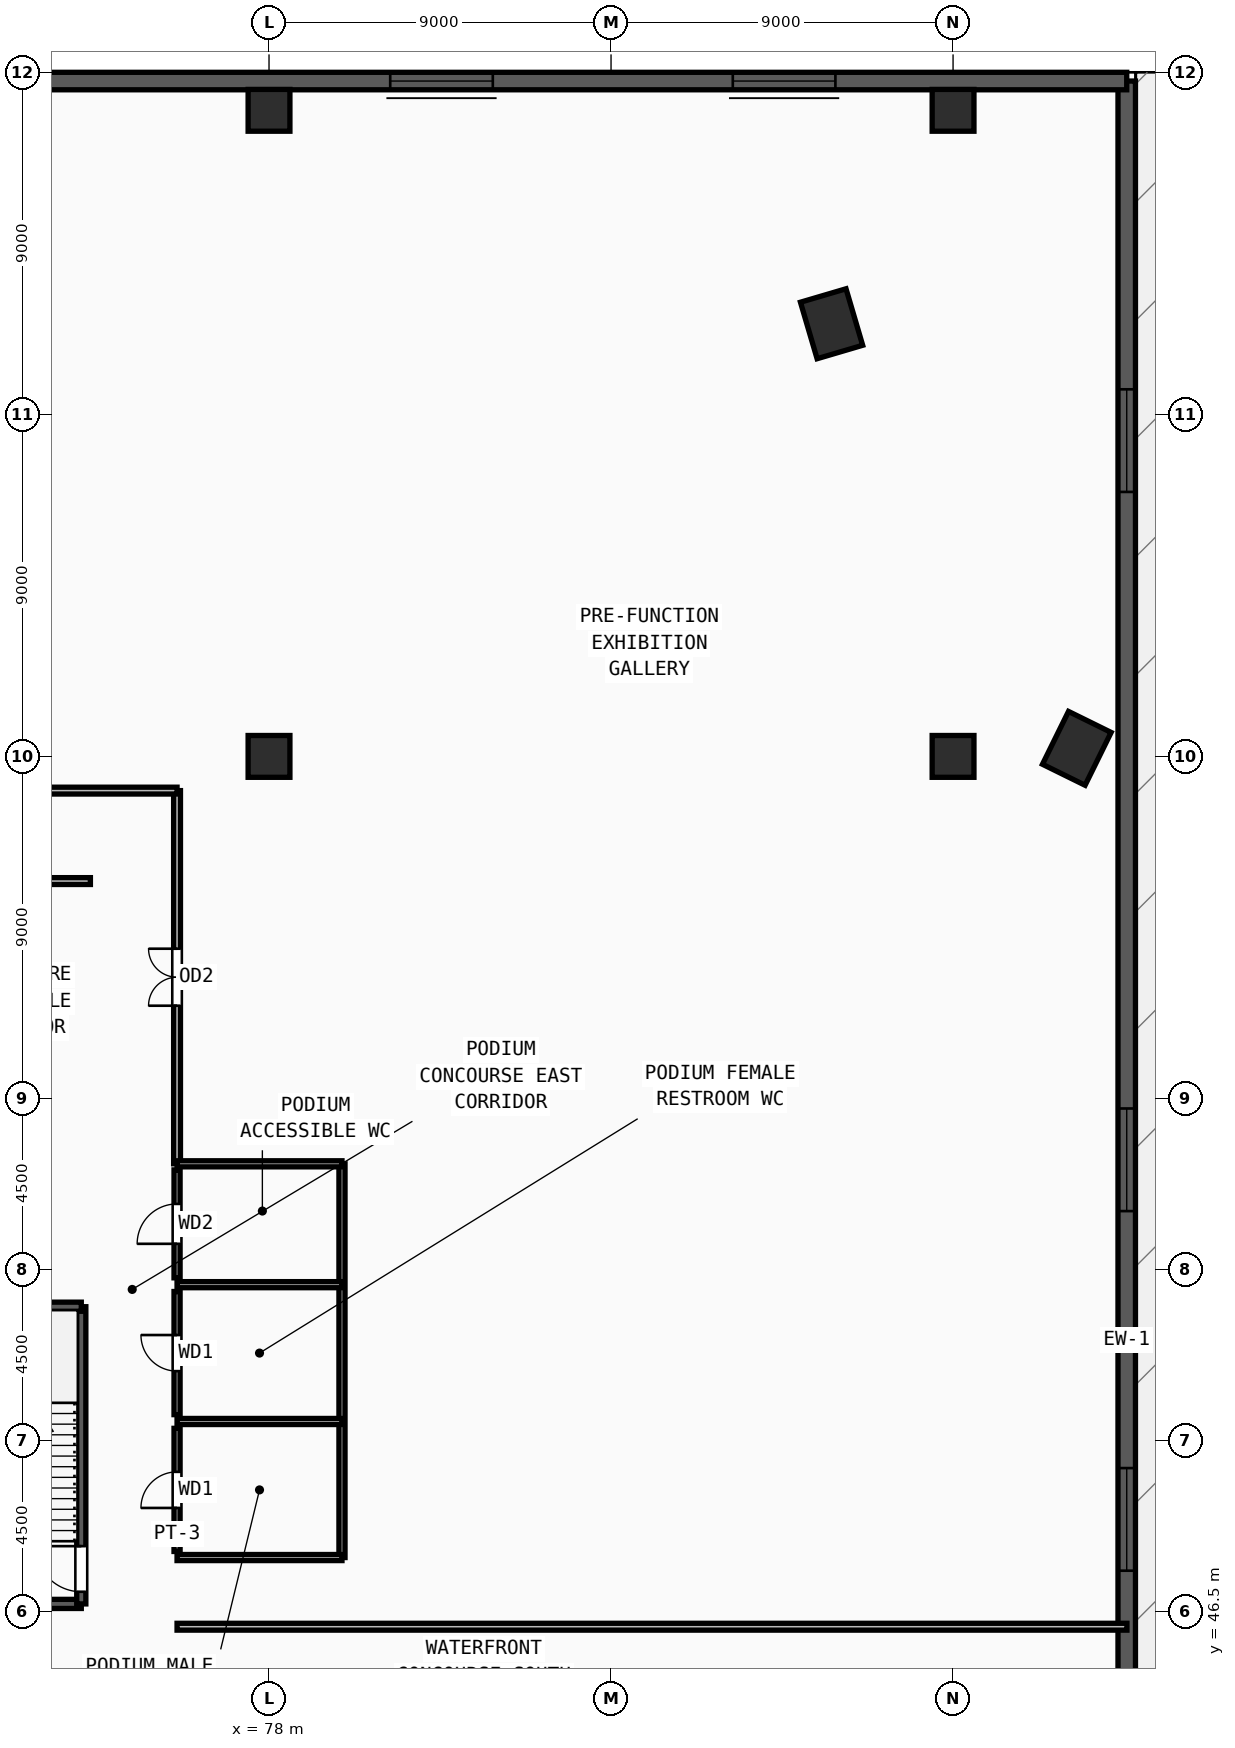
"""IFC4 building model, lengths in metres.
Left out: names, types, materials, properties, quantities, classifications, styles, units other than length and angle.
Written with IfcOpenShell. Run it as: python <this file> out.ifc"""

import sys

from ifc_helpers import new_model, si_unit, direction, frame, frame_2d, origin, origin_2d, place, context, subcontext, project, spatial, rectangle, extrude, source, transform, mapped, element, fill, save


model = new_model("IFC4")
c1 = context("Model", 3, precision=1e-05, world=origin(), true_north=direction((0.0, 1.0)))
c2 = subcontext(c1, "Body", "Model", "MODEL_VIEW")
j1 = project(units=[si_unit("LENGTHUNIT", "METRE"), si_unit("PLANEANGLEUNIT", "RADIAN")], contexts=[c1])
p1 = place(None, origin())
s1 = spatial("IfcSite", under=j1, at=p1, CompositionType="ELEMENT")
p2 = place(p1, origin())
s2 = spatial("IfcBuilding", under=s1, at=p2, CompositionType="ELEMENT")
p3 = place(p2, frame((0.0, 0.0, 9.9)))
s3 = spatial("IfcBuildingStorey", under=s2, at=p3, CompositionType="ELEMENT", Elevation=9.9)
m1 = source(origin(), c2, "Body", "SweptSolid", [
    extrude(rectangle(XDim=1.55, YDim=1.25, at=origin_2d()), origin(), (0.0, 0.0, 1.0), 4.5),
])
for number, where, z_axis, x_axis in (
    (1, (92.803, 80.384, 0.0), (0.0, 0.0, 1.0), (-0.283, 0.959, 0.0)),
    (2, (99.256, 69.212, 0.0), (0.0, 0.0, 1.0), (0.442, 0.897, 0.0)),
):
    element("IfcColumn", number, at=place(p3, frame(where, z_axis=z_axis, x_axis=x_axis)), inside=s3, PredefinedType="COLUMN", context=c2, shape_type="MappedRepresentation", body=[
        mapped(m1, transform((0.0, 0.0, 0.0), x_axis=(1.0, 0.0, 0.0), y_axis=(0.0, 1.0, 0.0), z_axis=(0.0, 0.0, 1.0), scale=1.0)),
    ])
m2 = source(origin(), c2, "Body", "SweptSolid", [
    extrude(rectangle(XDim=1.1, YDim=1.1, at=origin_2d()), origin(), (0.0, 0.0, 1.0), 4.5),
])
for number, where, z_axis, x_axis in (
    (3, (78.0, 69.0, 0.0), (0.0, 0.0, 1.0), (1.0, 0.0, 0.0)),
    (4, (96.0, 69.0, 0.0), (0.0, 0.0, 1.0), (1.0, 0.0, 0.0)),
    (5, (78.0, 86.0, 0.0), (0.0, 0.0, 1.0), (1.0, 0.0, 0.0)),
    (6, (96.0, 86.0, 0.0), (0.0, 0.0, 1.0), (1.0, 0.0, 0.0)),
):
    element("IfcColumn", number, at=place(p3, frame(where, z_axis=z_axis, x_axis=x_axis)), inside=s3, PredefinedType="COLUMN", context=c2, shape_type="MappedRepresentation", body=[
        mapped(m2, transform((0.0, 0.0, 0.0), x_axis=(1.0, 0.0, 0.0), y_axis=(0.0, 1.0, 0.0), z_axis=(0.0, 0.0, 1.0), scale=1.0)),
    ])
p4 = place(p3, frame((100.57, 20.54, 0.0), z_axis=(0.0, 0.0, 1.0), x_axis=(0.0, 1.0, 0.0)))
e7 = element("IfcWall", 7, at=p4, inside=s3, PredefinedType="SOLIDWALL", context=c2, shape_type="SweptSolid", body=[
    extrude(rectangle(XDim=66.23, YDim=0.46, at=frame_2d((33.115, 0.0))), origin(), (0.0, 0.0, 1.0), 4.25),
])
m3 = source(origin(), c2, "Body", "SweptSolid", [
    extrude(rectangle(XDim=2.7, YDim=2.35, at=frame_2d((1.35, 1.175))), frame((0.0, 0.24, 0.0), z_axis=(0.0, -1.0, 0.0), x_axis=(1.0, 0.0, 0.0)), (0.0, 0.0, 1.0), 0.48),
])
p5 = place(p4, frame((8.111, 0.0, 0.55)))
e8 = element("IfcOpeningElement", 8, at=p5, cuts=e7, PredefinedType="OPENING", context=c2, shape_type="MappedRepresentation", body=[
    mapped(m3, transform((0.0, 0.0, 0.0), x_axis=(1.0, 0.0, 0.0), y_axis=(0.0, 1.0, 0.0), z_axis=(0.0, 0.0, 1.0), scale=1.0)),
])
p6 = place(p4, frame((17.573, 0.0, 0.55)))
e9 = element("IfcOpeningElement", 9, at=p6, cuts=e7, PredefinedType="OPENING", context=c2, shape_type="MappedRepresentation", body=[
    mapped(m3, transform((0.0, 0.0, 0.0), x_axis=(1.0, 0.0, 0.0), y_axis=(0.0, 1.0, 0.0), z_axis=(0.0, 0.0, 1.0), scale=1.0)),
])
p7 = place(p4, frame((27.034, 0.0, 0.55)))
e10 = element("IfcOpeningElement", 10, at=p7, cuts=e7, PredefinedType="OPENING", context=c2, shape_type="MappedRepresentation", body=[
    mapped(m3, transform((0.0, 0.0, 0.0), x_axis=(1.0, 0.0, 0.0), y_axis=(0.0, 1.0, 0.0), z_axis=(0.0, 0.0, 1.0), scale=1.0)),
])
p8 = place(p4, frame((36.496, 0.0, 0.55)))
e11 = element("IfcOpeningElement", 11, at=p8, cuts=e7, PredefinedType="OPENING", context=c2, shape_type="MappedRepresentation", body=[
    mapped(m3, transform((0.0, 0.0, 0.0), x_axis=(1.0, 0.0, 0.0), y_axis=(0.0, 1.0, 0.0), z_axis=(0.0, 0.0, 1.0), scale=1.0)),
])
p9 = place(p4, frame((55.419, 0.0, 0.55)))
e12 = element("IfcOpeningElement", 12, at=p9, cuts=e7, PredefinedType="OPENING", context=c2, shape_type="MappedRepresentation", body=[
    mapped(m3, transform((0.0, 0.0, 0.0), x_axis=(1.0, 0.0, 0.0), y_axis=(0.0, 1.0, 0.0), z_axis=(0.0, 0.0, 1.0), scale=1.0)),
])
p10 = place(p3, frame((100.57, 86.77, 0.0), z_axis=(0.0, 0.0, 1.0), x_axis=(-1.0, 0.0, 0.0)))
e13 = element("IfcWall", 13, at=p10, inside=s3, PredefinedType="SOLIDWALL", context=c2, shape_type="SweptSolid", body=[
    extrude(rectangle(XDim=81.14, YDim=0.46, at=frame_2d((40.57, 0.0))), origin(), (0.0, 0.0, 1.0), 4.25),
])
p11 = place(p10, frame((7.666, 0.0, 0.55)))
e14 = element("IfcOpeningElement", 14, at=p11, cuts=e13, PredefinedType="OPENING", context=c2, shape_type="MappedRepresentation", body=[
    mapped(m3, transform((0.0, 0.0, 0.0), x_axis=(1.0, 0.0, 0.0), y_axis=(0.0, 1.0, 0.0), z_axis=(0.0, 0.0, 1.0), scale=1.0)),
])
p12 = place(p10, frame((16.681, 0.0, 0.55)))
e15 = element("IfcOpeningElement", 15, at=p12, cuts=e13, PredefinedType="OPENING", context=c2, shape_type="MappedRepresentation", body=[
    mapped(m3, transform((0.0, 0.0, 0.0), x_axis=(1.0, 0.0, 0.0), y_axis=(0.0, 1.0, 0.0), z_axis=(0.0, 0.0, 1.0), scale=1.0)),
])
p13 = place(p10, frame((34.712, 0.0, 0.55)))
e16 = element("IfcOpeningElement", 16, at=p13, cuts=e13, PredefinedType="OPENING", context=c2, shape_type="MappedRepresentation", body=[
    mapped(m3, transform((0.0, 0.0, 0.0), x_axis=(1.0, 0.0, 0.0), y_axis=(0.0, 1.0, 0.0), z_axis=(0.0, 0.0, 1.0), scale=1.0)),
])
p14 = place(p10, frame((43.728, 0.0, 0.55)))
e17 = element("IfcOpeningElement", 17, at=p14, cuts=e13, PredefinedType="OPENING", context=c2, shape_type="MappedRepresentation", body=[
    mapped(m3, transform((0.0, 0.0, 0.0), x_axis=(1.0, 0.0, 0.0), y_axis=(0.0, 1.0, 0.0), z_axis=(0.0, 0.0, 1.0), scale=1.0)),
])
p15 = place(p10, frame((61.759, 0.0, 0.55)))
e18 = element("IfcOpeningElement", 18, at=p15, cuts=e13, PredefinedType="OPENING", context=c2, shape_type="MappedRepresentation", body=[
    mapped(m3, transform((0.0, 0.0, 0.0), x_axis=(1.0, 0.0, 0.0), y_axis=(0.0, 1.0, 0.0), z_axis=(0.0, 0.0, 1.0), scale=1.0)),
])
p16 = place(p10, frame((70.774, 0.0, 0.55)))
e19 = element("IfcOpeningElement", 19, at=p16, cuts=e13, PredefinedType="OPENING", context=c2, shape_type="MappedRepresentation", body=[
    mapped(m3, transform((0.0, 0.0, 0.0), x_axis=(1.0, 0.0, 0.0), y_axis=(0.0, 1.0, 0.0), z_axis=(0.0, 0.0, 1.0), scale=1.0)),
])
p17 = place(p3, frame((69.62, 46.7, 0.0), z_axis=(0.0, 0.0, 1.0), x_axis=(1.0, 0.0, 0.0)))
e20 = element("IfcWall", 20, at=p17, inside=s3, PredefinedType="SOLIDWALL", context=c2, shape_type="SweptSolid", body=[
    extrude(rectangle(XDim=3.44, YDim=0.24, at=frame_2d((1.72, 0.0))), origin(), (0.0, 0.0, 1.0), 4.25),
])
p18 = place(p3, frame((73.06, 46.7, 0.0), z_axis=(0.0, 0.0, 1.0), x_axis=(0.0, 1.0, 0.0)))
e21 = element("IfcWall", 21, at=p18, inside=s3, PredefinedType="SOLIDWALL", context=c2, shape_type="SweptSolid", body=[
    extrude(rectangle(XDim=7.82, YDim=0.24, at=frame_2d((3.91, 0.0))), origin(), (0.0, 0.0, 1.0), 4.25),
])
m4 = source(origin(), c2, "Body", "SweptSolid", [
    extrude(rectangle(XDim=1.2, YDim=2.2, at=frame_2d((0.6, 1.1))), frame((0.0, 0.13, 0.0), z_axis=(0.0, -1.0, 0.0), x_axis=(1.0, 0.0, 0.0)), (0.0, 0.0, 1.0), 0.26),
])
p19 = place(p18, frame((0.32, 0.0, 0.0)))
e22 = element("IfcOpeningElement", 22, at=p19, cuts=e21, PredefinedType="OPENING", context=c2, shape_type="MappedRepresentation", body=[
    mapped(m4, transform((0.0, 0.0, 0.0), x_axis=(1.0, 0.0, 0.0), y_axis=(0.0, 1.0, 0.0), z_axis=(0.0, 0.0, 1.0), scale=1.0)),
])
p20 = place(p3, frame((73.06, 54.52, 0.0), z_axis=(0.0, 0.0, 1.0), x_axis=(-1.0, 0.0, 0.0)))
e23 = element("IfcWall", 23, at=p20, inside=s3, PredefinedType="SOLIDWALL", context=c2, shape_type="SweptSolid", body=[
    extrude(rectangle(XDim=3.44, YDim=0.24, at=frame_2d((1.72, 0.0))), origin(), (0.0, 0.0, 1.0), 4.25),
])
p21 = place(p3, frame((75.58, 48.08, 0.0), z_axis=(0.0, 0.0, 1.0), x_axis=(0.0, 1.0, 0.0)))
e24 = element("IfcWall", 24, at=p21, inside=s3, PredefinedType="PARTITIONING", context=c2, shape_type="SweptSolid", body=[
    extrude(rectangle(XDim=3.24, YDim=0.16, at=frame_2d((1.62, 0.0))), origin(), (0.0, 0.0, 1.0), 4.25),
])
m5 = source(origin(), c2, "Body", "SweptSolid", [
    extrude(rectangle(XDim=0.95, YDim=2.15, at=frame_2d((0.475, 1.075))), frame((0.0, 0.09, 0.0), z_axis=(0.0, -1.0, 0.0), x_axis=(1.0, 0.0, 0.0)), (0.0, 0.0, 1.0), 0.18),
])
p22 = place(p21, frame((1.145, 0.0, 0.0)))
e25 = element("IfcOpeningElement", 25, at=p22, cuts=e24, PredefinedType="OPENING", context=c2, shape_type="MappedRepresentation", body=[
    mapped(m5, transform((0.0, 0.0, 0.0), x_axis=(1.0, 0.0, 0.0), y_axis=(0.0, 1.0, 0.0), z_axis=(0.0, 0.0, 1.0), scale=1.0)),
])
p23 = place(p3, frame((75.58, 51.68, 0.0), z_axis=(0.0, 0.0, 1.0), x_axis=(0.0, 1.0, 0.0)))
e26 = element("IfcWall", 26, at=p23, inside=s3, PredefinedType="PARTITIONING", context=c2, shape_type="SweptSolid", body=[
    extrude(rectangle(XDim=3.24, YDim=0.16, at=frame_2d((1.62, 0.0))), origin(), (0.0, 0.0, 1.0), 4.25),
])
p24 = place(p23, frame((1.145, 0.0, 0.0)))
e27 = element("IfcOpeningElement", 27, at=p24, cuts=e26, PredefinedType="OPENING", context=c2, shape_type="MappedRepresentation", body=[
    mapped(m5, transform((0.0, 0.0, 0.0), x_axis=(1.0, 0.0, 0.0), y_axis=(0.0, 1.0, 0.0), z_axis=(0.0, 0.0, 1.0), scale=1.0)),
])
p25 = place(p3, frame((75.58, 55.28, 0.0), z_axis=(0.0, 0.0, 1.0), x_axis=(0.0, 1.0, 0.0)))
e28 = element("IfcWall", 28, at=p25, inside=s3, PredefinedType="PARTITIONING", context=c2, shape_type="SweptSolid", body=[
    extrude(rectangle(XDim=2.84, YDim=0.16, at=frame_2d((1.42, 0.0))), origin(), (0.0, 0.0, 1.0), 4.25),
])
m6 = source(origin(), c2, "Body", "SweptSolid", [
    extrude(rectangle(XDim=1.05, YDim=2.15, at=frame_2d((0.525, 1.075))), frame((0.0, 0.09, 0.0), z_axis=(0.0, -1.0, 0.0), x_axis=(1.0, 0.0, 0.0)), (0.0, 0.0, 1.0), 0.18),
])
p26 = place(p25, frame((0.895, 0.0, 0.0)))
e29 = element("IfcOpeningElement", 29, at=p26, cuts=e28, PredefinedType="OPENING", context=c2, shape_type="MappedRepresentation", body=[
    mapped(m6, transform((0.0, 0.0, 0.0), x_axis=(1.0, 0.0, 0.0), y_axis=(0.0, 1.0, 0.0), z_axis=(0.0, 0.0, 1.0), scale=1.0)),
])
p27 = place(p3, frame((69.46, 65.72, 0.0), z_axis=(0.0, 0.0, 1.0), x_axis=(1.0, 0.0, 0.0)))
e30 = element("IfcWall", 30, at=p27, inside=s3, PredefinedType="PARTITIONING", context=c2, shape_type="SweptSolid", body=[
    extrude(rectangle(XDim=3.84, YDim=0.18, at=frame_2d((1.92, 0.0))), origin(), (0.0, 0.0, 1.0), 4.25),
])
m7 = source(origin(), c2, "Body", "SweptSolid", [
    extrude(rectangle(XDim=1.3, YDim=2.2, at=frame_2d((0.65, 1.1))), frame((0.0, 0.1, 0.0), z_axis=(0.0, -1.0, 0.0), x_axis=(1.0, 0.0, 0.0)), (0.0, 0.0, 1.0), 0.2),
])
p28 = place(p27, frame((1.27, 0.0, 0.0)))
e31 = element("IfcOpeningElement", 31, at=p28, cuts=e30, PredefinedType="OPENING", context=c2, shape_type="MappedRepresentation", body=[
    mapped(m7, transform((0.0, 0.0, 0.0), x_axis=(1.0, 0.0, 0.0), y_axis=(0.0, 1.0, 0.0), z_axis=(0.0, 0.0, 1.0), scale=1.0)),
])
p29 = place(p3, frame((75.58, 58.28, 0.0), z_axis=(0.0, 0.0, 1.0), x_axis=(0.0, 1.0, 0.0)))
e32 = element("IfcWall", 32, at=p29, inside=s3, PredefinedType="PARTITIONING", context=c2, shape_type="SweptSolid", body=[
    extrude(rectangle(XDim=9.82, YDim=0.18, at=frame_2d((4.91, 0.0))), origin(), (0.0, 0.0, 1.0), 4.25),
])
m8 = source(origin(), c2, "Body", "SweptSolid", [
    extrude(rectangle(XDim=1.5, YDim=2.2, at=frame_2d((0.75, 1.1))), frame((0.0, 0.1, 0.0), z_axis=(0.0, -1.0, 0.0), x_axis=(1.0, 0.0, 0.0)), (0.0, 0.0, 1.0), 0.2),
])
p30 = place(p29, frame((4.16, 0.0, 0.0)))
e33 = element("IfcOpeningElement", 33, at=p30, cuts=e32, PredefinedType="OPENING", context=c2, shape_type="MappedRepresentation", body=[
    mapped(m8, transform((0.0, 0.0, 0.0), x_axis=(1.0, 0.0, 0.0), y_axis=(0.0, 1.0, 0.0), z_axis=(0.0, 0.0, 1.0), scale=1.0)),
])
p31 = place(p3, frame((79.92, 47.92, 0.0), z_axis=(0.0, 0.0, 1.0), x_axis=(0.0, 1.0, 0.0)))
e34 = element("IfcWall", 34, at=p31, inside=s3, PredefinedType="PARTITIONING", context=c2, shape_type="SweptSolid", body=[
    extrude(rectangle(XDim=10.36, YDim=0.16, at=frame_2d((5.18, 0.0))), origin(), (0.0, 0.0, 1.0), 4.25),
])
for number, where, z_axis, x_axis in (
    (35, (75.58, 47.92, 0.0), (0.0, 0.0, 1.0), (1.0, 0.0, 0.0)),
    (36, (75.58, 51.5, 0.0), (0.0, 0.0, 1.0), (1.0, 0.0, 0.0)),
    (37, (75.58, 55.1, 0.0), (0.0, 0.0, 1.0), (1.0, 0.0, 0.0)),
    (38, (75.58, 58.28, 0.0), (0.0, 0.0, 1.0), (1.0, 0.0, 0.0)),
):
    element("IfcWall", number, at=place(p3, frame(where, z_axis=z_axis, x_axis=x_axis)), inside=s3, PredefinedType="PARTITIONING", context=c2, shape_type="SweptSolid", body=[
        extrude(rectangle(XDim=4.34, YDim=0.16, at=frame_2d((2.17, 0.0))), origin(), (0.0, 0.0, 1.0), 4.25),
    ])
p32 = place(p3, frame((75.58, 46.1, 0.0), z_axis=(0.0, 0.0, 1.0), x_axis=(1.0, 0.0, 0.0)))
e39 = element("IfcWall", 39, at=p32, inside=s3, PredefinedType="PARTITIONING", context=c2, shape_type="SweptSolid", body=[
    extrude(rectangle(XDim=24.995, YDim=0.18, at=frame_2d((12.498, 0.0))), origin(), (0.0, 0.0, 1.0), 4.25),
])
p33 = place(p3, frame((71.7, 68.1, 0.0), z_axis=(0.0, 0.0, 1.0), x_axis=(1.0, 0.0, 0.0)))
e40 = element("IfcWall", 40, at=p33, inside=s3, PredefinedType="PARTITIONING", context=c2, shape_type="SweptSolid", body=[
    extrude(rectangle(XDim=3.88, YDim=0.18, at=frame_2d((1.94, 0.0))), origin(), (0.0, 0.0, 1.0), 4.25),
])
m9 = source(origin(), c2, "Body", "SweptSolid", [
    extrude(rectangle(XDim=2.7, YDim=2.35, at=frame_2d((1.35, 1.175))), frame((0.0, 0.03, 0.0), z_axis=(0.0, -1.0, 0.0), x_axis=(1.0, 0.0, 0.0)), (0.0, 0.0, 1.0), 0.06),
])
p34 = place(p7, origin())
e41 = element("IfcWindow", 41, at=p34, inside=s3, PartitioningType="TRIPLE_PANEL_VERTICAL", PredefinedType="WINDOW", context=c2, shape_type="MappedRepresentation", body=[
    mapped(m9, transform((0.0, 0.0, 0.0), x_axis=(1.0, 0.0, 0.0), y_axis=(0.0, 1.0, 0.0), z_axis=(0.0, 0.0, 1.0), scale=1.0)),
])
fill(e10, e41)
p35 = place(p8, origin())
e42 = element("IfcWindow", 42, at=p35, inside=s3, PartitioningType="TRIPLE_PANEL_VERTICAL", PredefinedType="WINDOW", context=c2, shape_type="MappedRepresentation", body=[
    mapped(m9, transform((0.0, 0.0, 0.0), x_axis=(1.0, 0.0, 0.0), y_axis=(0.0, 1.0, 0.0), z_axis=(0.0, 0.0, 1.0), scale=1.0)),
])
fill(e11, e42)
p36 = place(p9, origin())
e43 = element("IfcWindow", 43, at=p36, inside=s3, PartitioningType="TRIPLE_PANEL_VERTICAL", PredefinedType="WINDOW", context=c2, shape_type="MappedRepresentation", body=[
    mapped(m9, transform((0.0, 0.0, 0.0), x_axis=(1.0, 0.0, 0.0), y_axis=(0.0, 1.0, 0.0), z_axis=(0.0, 0.0, 1.0), scale=1.0)),
])
fill(e12, e43)
p37 = place(p11, origin())
e44 = element("IfcWindow", 44, at=p37, inside=s3, PartitioningType="TRIPLE_PANEL_VERTICAL", PredefinedType="WINDOW", context=c2, shape_type="MappedRepresentation", body=[
    mapped(m9, transform((0.0, 0.0, 0.0), x_axis=(1.0, 0.0, 0.0), y_axis=(0.0, 1.0, 0.0), z_axis=(0.0, 0.0, 1.0), scale=1.0)),
])
fill(e14, e44)
p38 = place(p12, origin())
e45 = element("IfcWindow", 45, at=p38, inside=s3, PartitioningType="TRIPLE_PANEL_VERTICAL", PredefinedType="WINDOW", context=c2, shape_type="MappedRepresentation", body=[
    mapped(m9, transform((0.0, 0.0, 0.0), x_axis=(1.0, 0.0, 0.0), y_axis=(0.0, 1.0, 0.0), z_axis=(0.0, 0.0, 1.0), scale=1.0)),
])
fill(e15, e45)
m10 = source(origin(), c2, "Body", "SweptSolid", [
    extrude(rectangle(XDim=1.2, YDim=2.2, at=frame_2d((0.6, 1.1))), frame((0.0, 0.025, 0.0), z_axis=(0.0, -1.0, 0.0), x_axis=(1.0, 0.0, 0.0)), (0.0, 0.0, 1.0), 0.05),
])
p39 = place(p19, origin())
e46 = element("IfcDoor", 46, at=p39, inside=s3, OperationType="SINGLE_SWING_RIGHT", PredefinedType="DOOR", context=c2, shape_type="MappedRepresentation", body=[
    mapped(m10, transform((0.0, 0.0, 0.0), x_axis=(1.0, 0.0, 0.0), y_axis=(0.0, 1.0, 0.0), z_axis=(0.0, 0.0, 1.0), scale=1.0)),
])
fill(e22, e46)
m11 = source(origin(), c2, "Body", "SweptSolid", [
    extrude(rectangle(XDim=0.95, YDim=2.15, at=frame_2d((0.475, 1.075))), frame((0.0, 0.025, 0.0), z_axis=(0.0, -1.0, 0.0), x_axis=(1.0, 0.0, 0.0)), (0.0, 0.0, 1.0), 0.05),
])
p40 = place(p22, origin())
e47 = element("IfcDoor", 47, at=p40, inside=s3, OperationType="SINGLE_SWING_LEFT", PredefinedType="DOOR", context=c2, shape_type="MappedRepresentation", body=[
    mapped(m11, transform((0.0, 0.0, 0.0), x_axis=(1.0, 0.0, 0.0), y_axis=(0.0, 1.0, 0.0), z_axis=(0.0, 0.0, 1.0), scale=1.0)),
])
fill(e25, e47)
p41 = place(p24, origin())
e48 = element("IfcDoor", 48, at=p41, inside=s3, OperationType="SINGLE_SWING_RIGHT", PredefinedType="DOOR", context=c2, shape_type="MappedRepresentation", body=[
    mapped(m11, transform((0.0, 0.0, 0.0), x_axis=(1.0, 0.0, 0.0), y_axis=(0.0, 1.0, 0.0), z_axis=(0.0, 0.0, 1.0), scale=1.0)),
])
fill(e27, e48)
m12 = source(origin(), c2, "Body", "SweptSolid", [
    extrude(rectangle(XDim=1.05, YDim=2.15, at=frame_2d((0.525, 1.075))), frame((0.0, 0.025, 0.0), z_axis=(0.0, -1.0, 0.0), x_axis=(1.0, 0.0, 0.0)), (0.0, 0.0, 1.0), 0.05),
])
p42 = place(p26, origin())
e49 = element("IfcDoor", 49, at=p42, inside=s3, OperationType="SINGLE_SWING_LEFT", PredefinedType="DOOR", context=c2, shape_type="MappedRepresentation", body=[
    mapped(m12, transform((0.0, 0.0, 0.0), x_axis=(1.0, 0.0, 0.0), y_axis=(0.0, 1.0, 0.0), z_axis=(0.0, 0.0, 1.0), scale=1.0)),
])
fill(e29, e49)
m13 = source(origin(), c2, "Body", "SweptSolid", [
    extrude(rectangle(XDim=1.5, YDim=2.2, at=frame_2d((0.75, 1.1))), frame((0.0, 0.025, 0.0), z_axis=(0.0, -1.0, 0.0), x_axis=(1.0, 0.0, 0.0)), (0.0, 0.0, 1.0), 0.05),
])
p43 = place(p30, origin())
e50 = element("IfcDoor", 50, at=p43, inside=s3, OperationType="DOUBLE_DOOR_SINGLE_SWING", PredefinedType="DOOR", context=c2, shape_type="MappedRepresentation", body=[
    mapped(m13, transform((0.0, 0.0, 0.0), x_axis=(1.0, 0.0, 0.0), y_axis=(0.0, 1.0, 0.0), z_axis=(0.0, 0.0, 1.0), scale=1.0)),
])
fill(e33, e50)
save(model, sys.argv[1])
